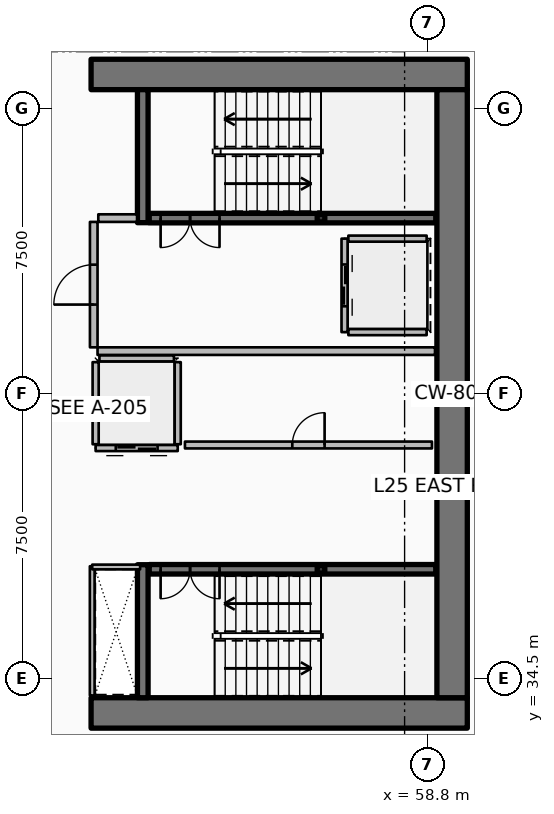
"""IFC4 building model, lengths in metres.
Left out: names, types, materials, properties, quantities, classifications, styles, units other than length and angle.
Written with IfcOpenShell. Run it as: python <this file> out.ifc"""

import sys

from ifc_helpers import new_model, si_unit, direction, frame, frame_2d, origin, origin_2d, place, context, subcontext, project, spatial, rectangle, hollow_rectangle, extrude, element, fill, save


model = new_model("IFC4")
c1 = context("Model", 3, precision=1e-05, world=origin(), true_north=direction((0.0, 1.0)))
c2 = subcontext(c1, "Body", "Model", "MODEL_VIEW")
j1 = project(units=[si_unit("LENGTHUNIT", "METRE"), si_unit("PLANEANGLEUNIT", "RADIAN")], contexts=[c1])
p1 = place(None, origin())
s1 = spatial("IfcSite", under=j1, at=p1, CompositionType="ELEMENT")
p2 = place(p1, origin())
s2 = spatial("IfcBuilding", under=s1, at=p2, CompositionType="ELEMENT")
p3 = place(p2, frame((0.0, 0.0, 101.4)))
s3 = spatial("IfcBuildingStorey", under=s2, at=p3, CompositionType="ELEMENT", Elevation=101.4)
for number, where, z_axis, x_axis in (
    (1, (49.95, 33.6, 0.0), (0.0, 0.0, 1.0), (1.0, 0.0, 0.0)),
    (2, (49.95, 50.4, 0.0), (0.0, 0.0, 1.0), (1.0, 0.0, 0.0)),
):
    element("IfcWall", number, at=place(p3, frame(where, z_axis=z_axis, x_axis=x_axis)), inside=s3, PredefinedType="SHEAR", context=c2, shape_type="SweptSolid", body=[
        extrude(rectangle(XDim=9.9, YDim=0.8, at=frame_2d((4.95, 0.0))), origin(), (0.0, 0.0, 1.0), 3.75),
    ])
p4 = place(p3, frame((59.45, 34.0, 0.0), z_axis=(0.0, 0.0, 1.0), x_axis=(0.0, 1.0, 0.0)))
e3 = element("IfcWall", 3, at=p4, inside=s3, PredefinedType="SHEAR", context=c2, shape_type="SweptSolid", body=[
    extrude(rectangle(XDim=16.0, YDim=0.8, at=frame_2d((8.0, 0.0))), origin(), (0.0, 0.0, 1.0), 3.75),
])
for number, where, z_axis, x_axis in (
    (4, (51.31, 46.5, 0.0), (0.0, 0.0, 1.0), (0.0, 1.0, 0.0)),
    (5, (51.31, 34.0, 0.0), (0.0, 0.0, 1.0), (0.0, 1.0, 0.0)),
):
    element("IfcWall", number, at=place(p3, frame(where, z_axis=z_axis, x_axis=x_axis)), inside=s3, PredefinedType="SHEAR", context=c2, shape_type="SweptSolid", body=[
        extrude(rectangle(XDim=3.5, YDim=0.28, at=frame_2d((1.75, 0.0))), origin(), (0.0, 0.0, 1.0), 3.75),
    ])
for number, where, z_axis, x_axis in (
    (6, (56.0, 46.62, 0.0), (0.0, 0.0, 1.0), (1.0, 0.0, 0.0)),
    (7, (56.0, 37.38, 0.0), (0.0, 0.0, 1.0), (1.0, 0.0, 0.0)),
):
    element("IfcColumn", number, at=place(p3, frame(where, z_axis=z_axis, x_axis=x_axis)), inside=s3, PredefinedType="COLUMN", context=c2, shape_type="SweptSolid", body=[
        extrude(hollow_rectangle(XDim=0.2, YDim=0.2, WallThickness=0.01, InnerFilletRadius=0.01, OuterFilletRadius=0.02, at=origin_2d()), origin(), (0.0, 0.0, 1.0), 1.67),
    ])
p5 = place(p3, frame((51.48, 46.62, 0.0), z_axis=(0.0, 0.0, 1.0), x_axis=(1.0, 0.0, 0.0)))
e8 = element("IfcWall", 8, at=p5, inside=s3, PredefinedType="SOLIDWALL", context=c2, shape_type="SweptSolid", body=[
    extrude(rectangle(XDim=7.54, YDim=0.25, at=frame_2d((3.77, 0.0))), origin(), (0.0, 0.0, 1.0), 3.5),
])
p6 = place(p5, frame((0.3, 0.0, 0.0)))
e9 = element("IfcOpeningElement", 9, at=p6, cuts=e8, PredefinedType="OPENING", context=c2, shape_type="SweptSolid", body=[
    extrude(rectangle(XDim=1.55, YDim=2.15, at=frame_2d((0.775, 1.075))), frame((0.0, 0.135, 0.0), z_axis=(0.0, -1.0, 0.0), x_axis=(1.0, 0.0, 0.0)), (0.0, 0.0, 1.0), 0.27),
])
p7 = place(p3, frame((51.48, 37.38, 0.0), z_axis=(0.0, 0.0, 1.0), x_axis=(1.0, 0.0, 0.0)))
e10 = element("IfcWall", 10, at=p7, inside=s3, PredefinedType="SOLIDWALL", context=c2, shape_type="SweptSolid", body=[
    extrude(rectangle(XDim=7.54, YDim=0.25, at=frame_2d((3.77, 0.0))), origin(), (0.0, 0.0, 1.0), 3.5),
])
p8 = place(p7, frame((0.3, 0.0, 0.0)))
e11 = element("IfcOpeningElement", 11, at=p8, cuts=e10, PredefinedType="OPENING", context=c2, shape_type="SweptSolid", body=[
    extrude(rectangle(XDim=1.55, YDim=2.15, at=frame_2d((0.775, 1.075))), frame((0.0, 0.135, 0.0), z_axis=(0.0, -1.0, 0.0), x_axis=(1.0, 0.0, 0.0)), (0.0, 0.0, 1.0), 0.27),
])
p9 = place(p3, frame((56.62, 46.08, 0.0), z_axis=(0.0, 0.0, 1.0), x_axis=(0.0, -1.0, 0.0)))
e12 = element("IfcWall", 12, at=p9, inside=s3, PredefinedType="PARTITIONING", context=c2, shape_type="SweptSolid", body=[
    extrude(rectangle(XDim=2.46, YDim=0.16, at=frame_2d((1.23, 0.0))), origin(), (0.0, 0.0, 1.0), 3.5),
])
p10 = place(p9, frame((0.68, 0.0, 0.0)))
e13 = element("IfcOpeningElement", 13, at=p10, cuts=e12, PredefinedType="OPENING", context=c2, shape_type="SweptSolid", body=[
    extrude(rectangle(XDim=1.1, YDim=2.1, at=frame_2d((0.55, 1.05))), frame((0.0, 0.09, 0.0), z_axis=(0.0, -1.0, 0.0), x_axis=(1.0, 0.0, 0.0)), (0.0, 0.0, 1.0), 0.18),
])
for number, where, z_axis, x_axis in (
    (14, (56.72, 46.08, 0.0), (0.0, 0.0, 1.0), (1.0, 0.0, 0.0)),
    (15, (56.72, 43.62, 0.0), (0.0, 0.0, 1.0), (1.0, 0.0, 0.0)),
):
    element("IfcWall", number, at=place(p3, frame(where, z_axis=z_axis, x_axis=x_axis)), inside=s3, PredefinedType="PARTITIONING", context=c2, shape_type="SweptSolid", body=[
        extrude(rectangle(XDim=2.06, YDim=0.16, at=frame_2d((1.03, 0.0))), origin(), (0.0, 0.0, 1.0), 3.5),
    ])
p11 = place(p3, frame((52.23, 40.57, 0.0), z_axis=(0.0, 0.0, 1.0), x_axis=(-1.0, 0.0, 0.0)))
e16 = element("IfcWall", 16, at=p11, inside=s3, PredefinedType="PARTITIONING", context=c2, shape_type="SweptSolid", body=[
    extrude(rectangle(XDim=2.16, YDim=0.16, at=frame_2d((1.08, 0.0))), origin(), (0.0, 0.0, 1.0), 3.5),
])
p12 = place(p11, frame((0.53, 0.0, 0.0)))
e17 = element("IfcOpeningElement", 17, at=p12, cuts=e16, PredefinedType="OPENING", context=c2, shape_type="SweptSolid", body=[
    extrude(rectangle(XDim=1.1, YDim=2.1, at=frame_2d((0.55, 1.05))), frame((0.0, 0.09, 0.0), z_axis=(0.0, -1.0, 0.0), x_axis=(1.0, 0.0, 0.0)), (0.0, 0.0, 1.0), 0.18),
])
for number, where, z_axis, x_axis in (
    (18, (52.23, 40.67, 0.0), (0.0, 0.0, 1.0), (0.0, 1.0, 0.0)),
    (19, (50.07, 40.67, 0.0), (0.0, 0.0, 1.0), (0.0, 1.0, 0.0)),
):
    element("IfcWall", number, at=place(p3, frame(where, z_axis=z_axis, x_axis=x_axis)), inside=s3, PredefinedType="PARTITIONING", context=c2, shape_type="SweptSolid", body=[
        extrude(rectangle(XDim=2.16, YDim=0.16, at=frame_2d((1.08, 0.0))), origin(), (0.0, 0.0, 1.0), 3.5),
    ])
p13 = place(p3, frame((50.17, 42.93, 0.0), z_axis=(0.0, 0.0, 1.0), x_axis=(1.0, 0.0, 0.0)))
e20 = element("IfcWall", 20, at=p13, inside=s3, PredefinedType="PARTITIONING", context=c2, shape_type="SweptSolid", body=[
    extrude(rectangle(XDim=1.96, YDim=0.16, at=frame_2d((0.98, 0.0))), origin(), (0.0, 0.0, 1.0), 3.5),
])
p14 = place(p3, frame((52.42, 40.65, 0.0), z_axis=(0.0, 0.0, 1.0), x_axis=(1.0, 0.0, 0.0)))
e21 = element("IfcWall", 21, at=p14, inside=s3, PredefinedType="PARTITIONING", context=c2, shape_type="SweptSolid", body=[
    extrude(rectangle(XDim=6.5, YDim=0.18, at=frame_2d((3.25, 0.0))), origin(), (0.0, 0.0, 1.0), 3.5),
])
p15 = place(p14, frame((2.825, 0.0, 0.0)))
e22 = element("IfcOpeningElement", 22, at=p15, cuts=e21, PredefinedType="OPENING", context=c2, shape_type="SweptSolid", body=[
    extrude(rectangle(XDim=0.85, YDim=2.06, at=frame_2d((0.425, 1.03))), frame((0.0, 0.1, 0.0), z_axis=(0.0, -1.0, 0.0), x_axis=(1.0, 0.0, 0.0)), (0.0, 0.0, 1.0), 0.2),
])
p16 = place(p3, frame((50.12, 43.12, 0.0), z_axis=(0.0, 0.0, 1.0), x_axis=(1.0, 0.0, 0.0)))
e23 = element("IfcWall", 23, at=p16, inside=s3, PredefinedType="PARTITIONING", context=c2, shape_type="SweptSolid", body=[
    extrude(rectangle(XDim=8.88, YDim=0.2, at=frame_2d((4.44, 0.0))), origin(), (0.0, 0.0, 1.0), 3.5),
])
p17 = place(p3, frame((50.14, 46.62, 0.0), z_axis=(0.0, 0.0, 1.0), x_axis=(1.0, 0.0, 0.0)))
e24 = element("IfcWall", 24, at=p17, inside=s3, PredefinedType="PARTITIONING", context=c2, shape_type="SweptSolid", body=[
    extrude(rectangle(XDim=1.02, YDim=0.2, at=frame_2d((0.51, 0.0))), origin(), (0.0, 0.0, 1.0), 3.5),
])
p18 = place(p3, frame((50.02, 43.22, 0.0), z_axis=(0.0, 0.0, 1.0), x_axis=(0.0, 1.0, 0.0)))
e25 = element("IfcWall", 25, at=p18, inside=s3, PredefinedType="PARTITIONING", context=c2, shape_type="SweptSolid", body=[
    extrude(rectangle(XDim=3.3, YDim=0.2, at=frame_2d((1.65, 0.0))), origin(), (0.0, 0.0, 1.0), 3.5),
])
p19 = place(p18, frame((1.125, 0.0, 0.0)))
e26 = element("IfcOpeningElement", 26, at=p19, cuts=e25, PredefinedType="OPENING", context=c2, shape_type="SweptSolid", body=[
    extrude(rectangle(XDim=1.05, YDim=2.1, at=frame_2d((0.525, 1.05))), frame((0.0, 0.11, 0.0), z_axis=(0.0, -1.0, 0.0), x_axis=(1.0, 0.0, 0.0)), (0.0, 0.0, 1.0), 0.22),
])
p20 = place(p3, frame((49.98, 34.06, 0.0), z_axis=(0.0, 0.0, 1.0), x_axis=(0.0, 1.0, 0.0)))
e27 = element("IfcWall", 27, at=p20, inside=s3, PredefinedType="PARTITIONING", context=c2, shape_type="SweptSolid", body=[
    extrude(rectangle(XDim=3.4, YDim=0.125, at=frame_2d((1.7, 0.0))), origin(), (0.0, 0.0, 1.0), 2.94),
])
p21 = place(p3, frame((49.98, 37.44, 0.0), z_axis=(0.0, 0.0, 1.0), x_axis=(1.0, 0.0, 0.0)))
e28 = element("IfcWall", 28, at=p21, inside=s3, PredefinedType="PARTITIONING", context=c2, shape_type="SweptSolid", body=[
    extrude(rectangle(XDim=1.26, YDim=0.125, at=frame_2d((0.63, 0.0))), origin(), (0.0, 0.0, 1.0), 2.94),
])
p22 = place(p6, origin())
e29 = element("IfcDoor", 29, at=p22, inside=s3, OperationType="DOUBLE_DOOR_SINGLE_SWING", PredefinedType="DOOR", context=c2, shape_type="SweptSolid", body=[
    extrude(rectangle(XDim=1.55, YDim=2.15, at=frame_2d((0.775, 1.075))), frame((0.0, 0.025, 0.0), z_axis=(0.0, -1.0, 0.0), x_axis=(1.0, 0.0, 0.0)), (0.0, 0.0, 1.0), 0.05),
])
fill(e9, e29)
p23 = place(p8, origin())
e30 = element("IfcDoor", 30, at=p23, inside=s3, OperationType="DOUBLE_DOOR_SINGLE_SWING", PredefinedType="DOOR", context=c2, shape_type="SweptSolid", body=[
    extrude(rectangle(XDim=1.55, YDim=2.15, at=frame_2d((0.775, 1.075))), frame((0.0, 0.025, 0.0), z_axis=(0.0, -1.0, 0.0), x_axis=(1.0, 0.0, 0.0)), (0.0, 0.0, 1.0), 0.05),
])
fill(e11, e30)
p24 = place(p10, origin())
e31 = element("IfcDoor", 31, at=p24, inside=s3, OperationType="DOUBLE_DOOR_SLIDING", PredefinedType="DOOR", context=c2, shape_type="SweptSolid", body=[
    extrude(rectangle(XDim=1.1, YDim=2.1, at=frame_2d((0.55, 1.05))), frame((0.0, 0.025, 0.0), z_axis=(0.0, -1.0, 0.0), x_axis=(1.0, 0.0, 0.0)), (0.0, 0.0, 1.0), 0.05),
])
fill(e13, e31)
p25 = place(p12, origin())
e32 = element("IfcDoor", 32, at=p25, inside=s3, OperationType="DOUBLE_DOOR_SLIDING", PredefinedType="DOOR", context=c2, shape_type="SweptSolid", body=[
    extrude(rectangle(XDim=1.1, YDim=2.1, at=frame_2d((0.55, 1.05))), frame((0.0, 0.025, 0.0), z_axis=(0.0, -1.0, 0.0), x_axis=(1.0, 0.0, 0.0)), (0.0, 0.0, 1.0), 0.05),
])
fill(e17, e32)
p26 = place(p15, origin())
e33 = element("IfcDoor", 33, at=p26, inside=s3, OperationType="SINGLE_SWING_RIGHT", PredefinedType="DOOR", context=c2, shape_type="SweptSolid", body=[
    extrude(rectangle(XDim=0.85, YDim=2.06, at=frame_2d((0.425, 1.03))), frame((0.0, 0.025, 0.0), z_axis=(0.0, -1.0, 0.0), x_axis=(1.0, 0.0, 0.0)), (0.0, 0.0, 1.0), 0.05),
])
fill(e22, e33)
p27 = place(p19, origin())
e34 = element("IfcDoor", 34, at=p27, inside=s3, OperationType="SINGLE_SWING_LEFT", PredefinedType="DOOR", context=c2, shape_type="SweptSolid", body=[
    extrude(rectangle(XDim=1.05, YDim=2.1, at=frame_2d((0.525, 1.05))), frame((0.0, 0.025, 0.0), z_axis=(0.0, -1.0, 0.0), x_axis=(1.0, 0.0, 0.0)), (0.0, 0.0, 1.0), 0.05),
])
fill(e26, e34)
save(model, sys.argv[1])
